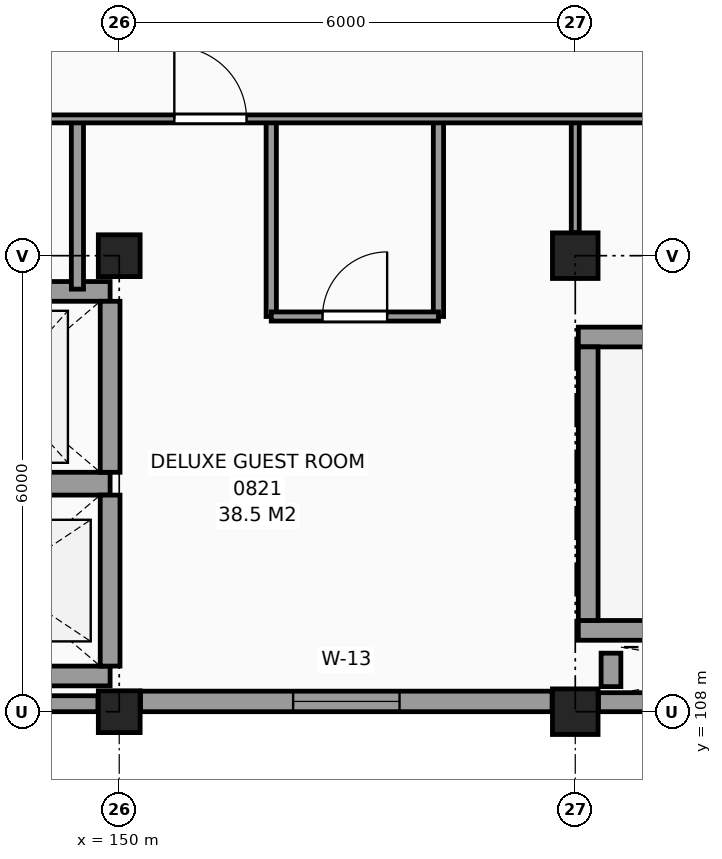
"""IFC4 building model, lengths in metres.
Left out: names, types, materials, properties, quantities, classifications, styles, units other than length and angle.
Written with IfcOpenShell. Run it as: python <this file> out.ifc"""

import sys

from ifc_helpers import new_model, si_unit, direction, frame, frame_2d, origin, origin_2d, place, context, subcontext, project, spatial, rectangle, extrude, element, fill, save


model = new_model("IFC4")
c1 = context("Model", 3, precision=1e-05, world=origin(), true_north=direction((0.0, 1.0)))
c2 = subcontext(c1, "Body", "Model", "MODEL_VIEW")
j1 = project(units=[si_unit("LENGTHUNIT", "METRE"), si_unit("PLANEANGLEUNIT", "RADIAN")], contexts=[c1])
p1 = place(None, origin())
s1 = spatial("IfcSite", under=j1, at=p1, CompositionType="ELEMENT")
p2 = place(p1, origin())
s2 = spatial("IfcBuilding", under=s1, at=p2, CompositionType="ELEMENT")
p3 = place(p2, frame((0.0, 0.0, 34.8)))
s3 = spatial("IfcBuildingStorey", under=s2, at=p3, CompositionType="ELEMENT", Elevation=34.8)
for number, where, z_axis, x_axis in (
    (1, (150.0, 108.0, 0.0), (0.0, 0.0, 1.0), (1.0, 0.0, 0.0)),
    (2, (150.0, 114.0, 0.0), (0.0, 0.0, 1.0), (1.0, 0.0, 0.0)),
):
    element("IfcColumn", number, at=place(p3, frame(where, z_axis=z_axis, x_axis=x_axis)), inside=s3, PredefinedType="COLUMN", context=c2, shape_type="SweptSolid", body=[
        extrude(rectangle(XDim=0.55, YDim=0.55, at=origin_2d()), origin(), (0.0, 0.0, 1.0), 3.3),
    ])
for number, where, z_axis, x_axis in (
    (3, (156.0, 108.0, 0.0), (0.0, 0.0, 1.0), (1.0, 0.0, 0.0)),
    (4, (156.0, 114.0, 0.0), (0.0, 0.0, 1.0), (1.0, 0.0, 0.0)),
):
    element("IfcColumn", number, at=place(p3, frame(where, z_axis=z_axis, x_axis=x_axis)), inside=s3, PredefinedType="COLUMN", context=c2, shape_type="SweptSolid", body=[
        extrude(rectangle(XDim=0.6, YDim=0.6, at=origin_2d()), origin(), (0.0, 0.0, 1.0), 3.3),
    ])
p4 = place(p3, frame((144.305, 108.105, 0.0), z_axis=(0.0, 0.0, 1.0), x_axis=(1.0, 0.0, 0.0)))
e5 = element("IfcWall", 5, at=p4, inside=s3, PredefinedType="SOLIDWALL", context=c2, shape_type="SweptSolid", body=[
    extrude(rectangle(XDim=5.415, YDim=0.21, at=frame_2d((2.708, 0.0))), origin(), (0.0, 0.0, 1.0), 2.42),
])
p5 = place(p3, frame((150.28, 108.135, 0.0), z_axis=(0.0, 0.0, 1.0), x_axis=(1.0, 0.0, 0.0)))
e6 = element("IfcWall", 6, at=p5, inside=s3, PredefinedType="SOLIDWALL", context=c2, shape_type="SweptSolid", body=[
    extrude(rectangle(XDim=5.415, YDim=0.27, at=frame_2d((2.708, 0.0))), origin(), (0.0, 0.0, 1.0), 2.42),
])
p6 = place(p5, frame((2.008, 0.0, 0.8)))
e7 = element("IfcOpeningElement", 7, at=p6, cuts=e6, PredefinedType="OPENING", context=c2, shape_type="SweptSolid", body=[
    extrude(rectangle(XDim=1.4, YDim=1.4, at=frame_2d((0.7, 0.7))), frame((0.0, 0.145, 0.0), z_axis=(0.0, -1.0, 0.0), x_axis=(1.0, 0.0, 0.0)), (0.0, 0.0, 1.0), 0.29),
])
p7 = place(p3, frame((156.305, 108.125, 0.0), z_axis=(0.0, 0.0, 1.0), x_axis=(1.0, 0.0, 0.0)))
e8 = element("IfcWall", 8, at=p7, inside=s3, PredefinedType="SOLIDWALL", context=c2, shape_type="SweptSolid", body=[
    extrude(rectangle(XDim=5.415, YDim=0.25, at=frame_2d((2.708, 0.0))), origin(), (0.0, 0.0, 1.0), 3.07),
])
for number, where, z_axis, x_axis in (
    (9, (156.04, 109.07, 0.0), (0.0, 0.0, 1.0), (1.0, 0.0, 0.0)),
    (10, (156.04, 112.93, 0.0), (0.0, 0.0, 1.0), (1.0, 0.0, 0.0)),
):
    element("IfcWall", number, at=place(p3, frame(where, z_axis=z_axis, x_axis=x_axis)), inside=s3, PredefinedType="SHEAR", context=c2, shape_type="SweptSolid", body=[
        extrude(rectangle(XDim=10.72, YDim=0.26, at=frame_2d((5.36, 0.0))), origin(), (0.0, 0.0, 1.0), 3.3),
    ])
p8 = place(p3, frame((156.17, 109.2, 0.0), z_axis=(0.0, 0.0, 1.0), x_axis=(0.0, 1.0, 0.0)))
e11 = element("IfcWall", 11, at=p8, inside=s3, PredefinedType="SHEAR", context=c2, shape_type="SweptSolid", body=[
    extrude(rectangle(XDim=3.6, YDim=0.26, at=frame_2d((1.8, 0.0))), origin(), (0.0, 0.0, 1.0), 3.3),
])
p9 = place(p3, frame((156.47, 108.33, 0.0), z_axis=(0.0, 0.0, 1.0), x_axis=(0.0, 1.0, 0.0)))
e12 = element("IfcWall", 12, at=p9, inside=s3, PredefinedType="SHEAR", context=c2, shape_type="SweptSolid", body=[
    extrude(rectangle(XDim=0.44, YDim=0.26, at=frame_2d((0.22, 0.0))), origin(), (0.0, 0.0, 1.0), 3.3),
])
p10 = place(p3, frame((146.97, 108.47, 0.0), z_axis=(0.0, 0.0, 1.0), x_axis=(1.0, 0.0, 0.0)))
e13 = element("IfcWall", 13, at=p10, inside=s3, PredefinedType="SHEAR", context=c2, shape_type="SweptSolid", body=[
    extrude(rectangle(XDim=2.91, YDim=0.26, at=frame_2d((1.455, 0.0))), origin(), (0.0, 0.0, 1.0), 3.3),
])
p11 = place(p3, frame((146.97, 111.0, 0.0), z_axis=(0.0, 0.0, 1.0), x_axis=(1.0, 0.0, 0.0)))
e14 = element("IfcWall", 14, at=p11, inside=s3, PredefinedType="SHEAR", context=c2, shape_type="SweptSolid", body=[
    extrude(rectangle(XDim=2.91, YDim=0.3, at=frame_2d((1.455, 0.0))), origin(), (0.0, 0.0, 1.0), 3.3),
])
p12 = place(p3, frame((149.88, 108.6, 0.0), z_axis=(0.0, 0.0, 1.0), x_axis=(0.0, 1.0, 0.0)))
e15 = element("IfcWall", 15, at=p12, inside=s3, PredefinedType="SHEAR", context=c2, shape_type="SweptSolid", body=[
    extrude(rectangle(XDim=2.25, YDim=0.26, at=frame_2d((1.125, 0.0))), origin(), (0.0, 0.0, 1.0), 3.3),
])
p13 = place(p3, frame((146.97, 113.53, 0.0), z_axis=(0.0, 0.0, 1.0), x_axis=(1.0, 0.0, 0.0)))
e16 = element("IfcWall", 16, at=p13, inside=s3, PredefinedType="SHEAR", context=c2, shape_type="SweptSolid", body=[
    extrude(rectangle(XDim=2.91, YDim=0.26, at=frame_2d((1.455, 0.0))), origin(), (0.0, 0.0, 1.0), 3.3),
])
p14 = place(p3, frame((149.88, 111.15, 0.0), z_axis=(0.0, 0.0, 1.0), x_axis=(0.0, 1.0, 0.0)))
e17 = element("IfcWall", 17, at=p14, inside=s3, PredefinedType="SHEAR", context=c2, shape_type="SweptSolid", body=[
    extrude(rectangle(XDim=2.25, YDim=0.26, at=frame_2d((1.125, 0.0))), origin(), (0.0, 0.0, 1.0), 3.3),
])
p15 = place(p3, frame((149.45, 113.56, 0.0), z_axis=(0.0, 0.0, 1.0), x_axis=(0.0, 1.0, 0.0)))
e18 = element("IfcWall", 18, at=p15, inside=s3, PredefinedType="PARTITIONING", context=c2, shape_type="SweptSolid", body=[
    extrude(rectangle(XDim=2.24, YDim=0.16, at=frame_2d((1.12, 0.0))), origin(), (0.0, 0.0, 1.0), 3.07),
])
for number, where, z_axis, x_axis in (
    (19, (152.0, 113.2, 0.0), (0.0, 0.0, 1.0), (0.0, 1.0, 0.0)),
    (20, (154.2, 113.2, 0.0), (0.0, 0.0, 1.0), (0.0, 1.0, 0.0)),
):
    element("IfcWall", number, at=place(p3, frame(where, z_axis=z_axis, x_axis=x_axis)), inside=s3, PredefinedType="PARTITIONING", context=c2, shape_type="SweptSolid", body=[
        extrude(rectangle(XDim=2.6, YDim=0.135, at=frame_2d((1.3, 0.0))), origin(), (0.0, 0.0, 1.0), 3.07),
    ])
p16 = place(p3, frame((156.0, 114.305, 0.0), z_axis=(0.0, 0.0, 1.0), x_axis=(0.0, 1.0, 0.0)))
e21 = element("IfcWall", 21, at=p16, inside=s3, PredefinedType="PARTITIONING", context=c2, shape_type="SweptSolid", body=[
    extrude(rectangle(XDim=1.495, YDim=0.105, at=frame_2d((0.748, 0.0))), origin(), (0.0, 0.0, 1.0), 2.57),
])
p17 = place(p3, frame((152.0, 113.2, 0.0), z_axis=(0.0, 0.0, 1.0), x_axis=(1.0, 0.0, 0.0)))
e22 = element("IfcWall", 22, at=p17, inside=s3, PredefinedType="PARTITIONING", context=c2, shape_type="SweptSolid", body=[
    extrude(rectangle(XDim=2.2, YDim=0.12, at=frame_2d((1.1, 0.0))), origin(), (0.0, 0.0, 1.0), 3.07),
])
p18 = place(p17, frame((0.675, 0.0, 0.0)))
e23 = element("IfcOpeningElement", 23, at=p18, cuts=e22, PredefinedType="OPENING", context=c2, shape_type="SweptSolid", body=[
    extrude(rectangle(XDim=0.85, YDim=2.1, at=frame_2d((0.425, 1.05))), frame((0.0, 0.07, 0.0), z_axis=(0.0, -1.0, 0.0), x_axis=(1.0, 0.0, 0.0)), (0.0, 0.0, 1.0), 0.14),
])
p19 = place(p3, frame((66.275, 115.8, 0.0), z_axis=(0.0, 0.0, 1.0), x_axis=(1.0, 0.0, 0.0)))
e24 = element("IfcWall", 24, at=p19, inside=s3, PredefinedType="PARTITIONING", context=c2, shape_type="SweptSolid", body=[
    extrude(rectangle(XDim=103.525, YDim=0.105, at=frame_2d((51.763, 0.0))), origin(), (0.0, 0.0, 1.0), 3.07),
])
p20 = place(p19, frame((80.125, 0.0, 0.0)))
e25 = element("IfcOpeningElement", 25, at=p20, cuts=e24, PredefinedType="OPENING", context=c2, shape_type="SweptSolid", body=[
    extrude(rectangle(XDim=1.2, YDim=2.2, at=frame_2d((0.6, 1.1))), frame((0.0, 0.062, 0.0), z_axis=(0.0, -1.0, 0.0), x_axis=(1.0, 0.0, 0.0)), (0.0, 0.0, 1.0), 0.125),
])
p21 = place(p19, frame((50.125, 0.0, 0.0)))
e26 = element("IfcOpeningElement", 26, at=p21, cuts=e24, PredefinedType="OPENING", context=c2, shape_type="SweptSolid", body=[
    extrude(rectangle(XDim=1.2, YDim=2.2, at=frame_2d((0.6, 1.1))), frame((0.0, 0.062, 0.0), z_axis=(0.0, -1.0, 0.0), x_axis=(1.0, 0.0, 0.0)), (0.0, 0.0, 1.0), 0.125),
])
p22 = place(p19, frame((8.975, 0.0, 0.0)))
e27 = element("IfcOpeningElement", 27, at=p22, cuts=e24, PredefinedType="OPENING", context=c2, shape_type="SweptSolid", body=[
    extrude(rectangle(XDim=1.1, YDim=2.15, at=frame_2d((0.55, 1.075))), frame((0.0, 0.062, 0.0), z_axis=(0.0, -1.0, 0.0), x_axis=(1.0, 0.0, 0.0)), (0.0, 0.0, 1.0), 0.125),
])
p23 = place(p19, frame((55.275, 0.0, 0.0)))
e28 = element("IfcOpeningElement", 28, at=p23, cuts=e24, PredefinedType="OPENING", context=c2, shape_type="SweptSolid", body=[
    extrude(rectangle(XDim=1.0, YDim=2.15, at=frame_2d((0.5, 1.075))), frame((0.0, 0.062, 0.0), z_axis=(0.0, -1.0, 0.0), x_axis=(1.0, 0.0, 0.0)), (0.0, 0.0, 1.0), 0.125),
])
p24 = place(p19, frame((62.245, 0.0, 0.0)))
e29 = element("IfcOpeningElement", 29, at=p24, cuts=e24, PredefinedType="OPENING", context=c2, shape_type="SweptSolid", body=[
    extrude(rectangle(XDim=0.96, YDim=2.15, at=frame_2d((0.48, 1.075))), frame((0.0, 0.062, 0.0), z_axis=(0.0, -1.0, 0.0), x_axis=(1.0, 0.0, 0.0)), (0.0, 0.0, 1.0), 0.125),
])
p25 = place(p19, frame((31.925, 0.0, 0.0)))
e30 = element("IfcOpeningElement", 30, at=p25, cuts=e24, PredefinedType="OPENING", context=c2, shape_type="SweptSolid", body=[
    extrude(rectangle(XDim=1.6, YDim=2.25, at=frame_2d((0.8, 1.125))), frame((0.0, 0.062, 0.0), z_axis=(0.0, -1.0, 0.0), x_axis=(1.0, 0.0, 0.0)), (0.0, 0.0, 1.0), 0.125),
])
p26 = place(p19, frame((18.55, 0.0, 0.0)))
e31 = element("IfcOpeningElement", 31, at=p26, cuts=e24, PredefinedType="OPENING", context=c2, shape_type="SweptSolid", body=[
    extrude(rectangle(XDim=0.95, YDim=2.1, at=frame_2d((0.475, 1.05))), frame((0.0, 0.062, 0.0), z_axis=(0.0, -1.0, 0.0), x_axis=(1.0, 0.0, 0.0)), (0.0, 0.0, 1.0), 0.125),
])
p27 = place(p19, frame((84.45, 0.0, 0.0)))
e32 = element("IfcOpeningElement", 32, at=p27, cuts=e24, PredefinedType="OPENING", context=c2, shape_type="SweptSolid", body=[
    extrude(rectangle(XDim=0.95, YDim=2.1, at=frame_2d((0.475, 1.05))), frame((0.0, 0.062, 0.0), z_axis=(0.0, -1.0, 0.0), x_axis=(1.0, 0.0, 0.0)), (0.0, 0.0, 1.0), 0.125),
])
p28 = place(p6, origin())
e33 = element("IfcWindow", 33, at=p28, inside=s3, PartitioningType="SINGLE_PANEL", PredefinedType="WINDOW", context=c2, shape_type="SweptSolid", body=[
    extrude(rectangle(XDim=1.4, YDim=1.4, at=frame_2d((0.7, 0.7))), frame((0.0, 0.03, 0.0), z_axis=(0.0, -1.0, 0.0), x_axis=(1.0, 0.0, 0.0)), (0.0, 0.0, 1.0), 0.06),
])
fill(e7, e33)
p29 = place(p18, origin())
e34 = element("IfcDoor", 34, at=p29, inside=s3, OperationType="SINGLE_SWING_RIGHT", PredefinedType="DOOR", context=c2, shape_type="SweptSolid", body=[
    extrude(rectangle(XDim=0.85, YDim=2.1, at=frame_2d((0.425, 1.05))), frame((0.0, 0.025, 0.0), z_axis=(0.0, -1.0, 0.0), x_axis=(1.0, 0.0, 0.0)), (0.0, 0.0, 1.0), 0.05),
])
fill(e23, e34)
p30 = place(p27, origin())
e35 = element("IfcDoor", 35, at=p30, inside=s3, OperationType="SINGLE_SWING_LEFT", PredefinedType="DOOR", context=c2, shape_type="SweptSolid", body=[
    extrude(rectangle(XDim=0.95, YDim=2.1, at=frame_2d((0.475, 1.05))), frame((0.0, 0.025, 0.0), z_axis=(0.0, -1.0, 0.0), x_axis=(1.0, 0.0, 0.0)), (0.0, 0.0, 1.0), 0.05),
])
fill(e32, e35)
save(model, sys.argv[1])
